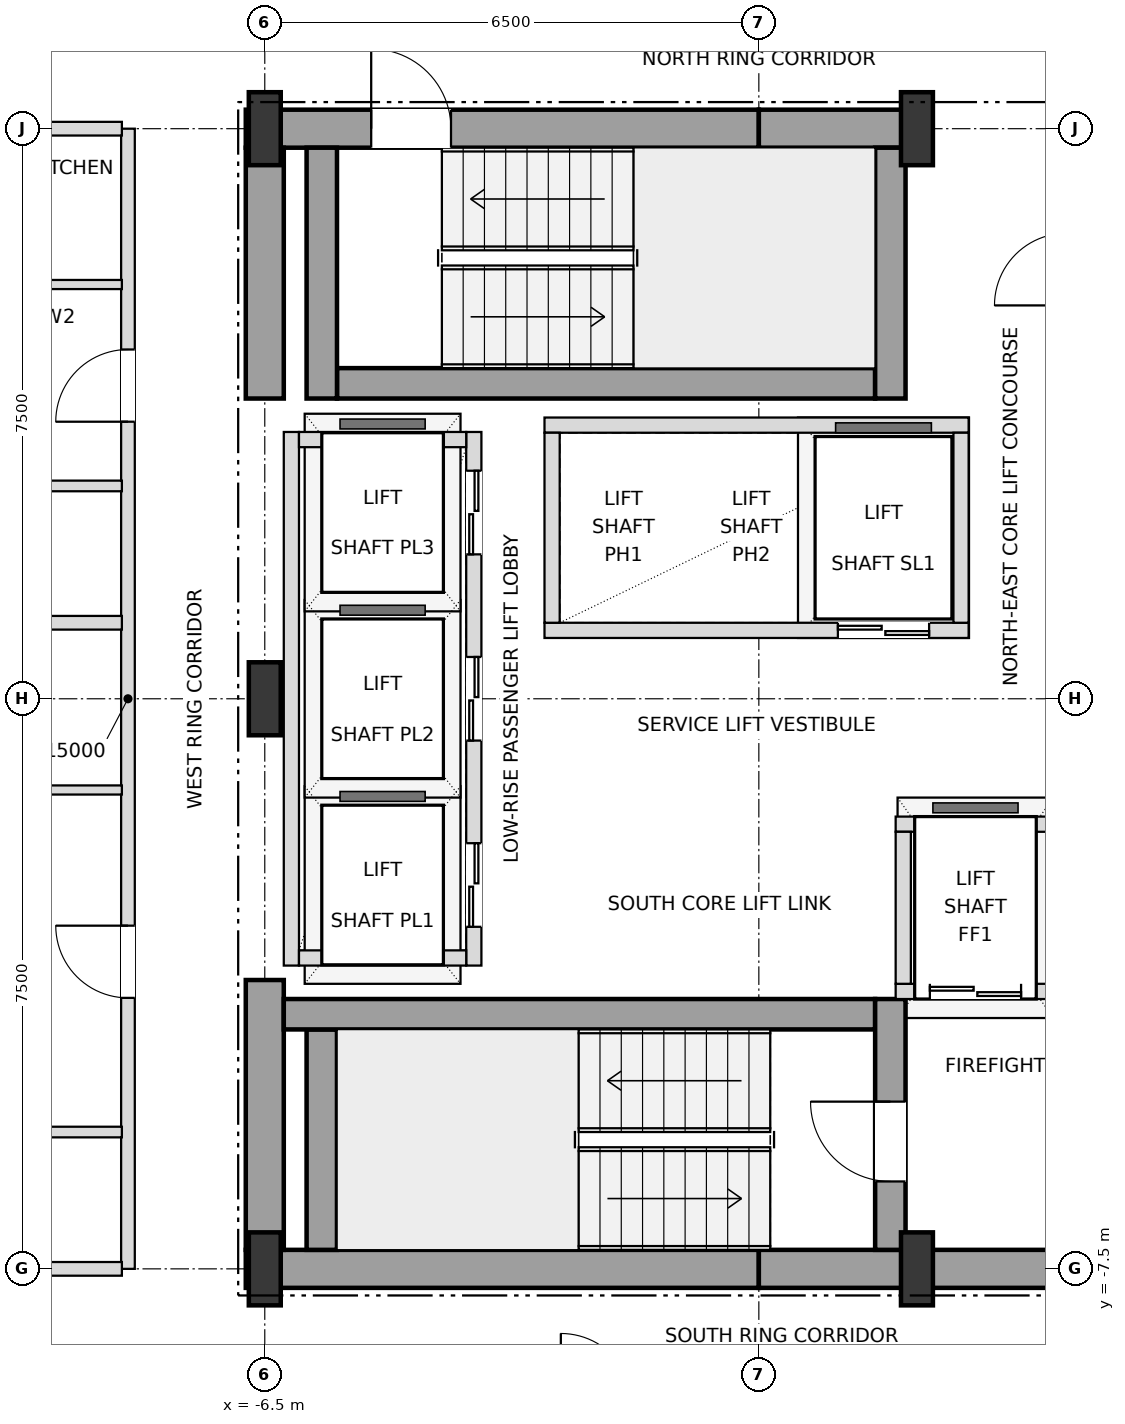
"""IFC4 building model, lengths in metres.
Left out: names, types, materials, properties, quantities, classifications, styles, units other than length and angle.
Written with IfcOpenShell. Run it as: python <this file> out.ifc"""

import sys

from ifc_helpers import new_model, si_unit, direction, frame, frame_2d, origin, origin_2d, place, context, subcontext, project, spatial, rectangle, i_section, extrude, element, fill, save


model = new_model("IFC4")
c1 = context("Model", 3, precision=1e-05, world=origin(), true_north=direction((0.0, 1.0)))
c2 = subcontext(c1, "Body", "Model", "MODEL_VIEW")
j1 = project(units=[si_unit("LENGTHUNIT", "METRE"), si_unit("PLANEANGLEUNIT", "RADIAN")], contexts=[c1])
p1 = place(None, origin())
s1 = spatial("IfcSite", under=j1, at=p1, CompositionType="ELEMENT")
p2 = place(p1, origin())
s2 = spatial("IfcBuilding", under=s1, at=p2, CompositionType="ELEMENT")
p3 = place(p2, frame((0.0, 0.0, 50.4)))
s3 = spatial("IfcBuildingStorey", under=s2, at=p3, CompositionType="ELEMENT", Elevation=50.4)
for number, where, z_axis, x_axis in (
    (1, (-6.5, -7.5, 0.0), (0.0, 0.0, 1.0), (1.0, 0.0, 0.0)),
    (2, (2.08, -7.5, 0.0), (0.0, 0.0, 1.0), (1.0, 0.0, 0.0)),
    (3, (-6.5, 0.0, 0.0), (0.0, 0.0, 1.0), (1.0, 0.0, 0.0)),
    (4, (-6.5, 7.5, 0.0), (0.0, 0.0, 1.0), (1.0, 0.0, 0.0)),
    (5, (2.08, 7.5, 0.0), (0.0, 0.0, 1.0), (1.0, 0.0, 0.0)),
):
    element("IfcColumn", number, at=place(p3, frame(where, z_axis=z_axis, x_axis=x_axis)), inside=s3, PredefinedType="COLUMN", context=c2, shape_type="SweptSolid", body=[
        extrude(i_section(OverallWidth=0.42, OverallDepth=0.96, WebThickness=0.022, FlangeThickness=0.034, at=origin_2d()), origin(), (0.0, 0.0, 1.0), 3.6),
    ])
for number, where, z_axis, x_axis in (
    (6, (-6.75, -7.5, 0.0), (0.0, 0.0, 1.0), (1.0, 0.0, 0.0)),
    (7, (0.0, -7.5, 0.0), (0.0, 0.0, 1.0), (1.0, 0.0, 0.0)),
):
    element("IfcWall", number, at=place(p3, frame(where, z_axis=z_axis, x_axis=x_axis)), inside=s3, PredefinedType="SHEAR", context=c2, shape_type="SweptSolid", body=[
        extrude(rectangle(XDim=6.75, YDim=0.5, at=frame_2d((3.375, 0.0))), origin(), (0.0, 0.0, 1.0), 3.38),
    ])
p4 = place(p3, frame((-6.75, 7.5, 0.0), z_axis=(0.0, 0.0, 1.0), x_axis=(1.0, 0.0, 0.0)))
e8 = element("IfcWall", 8, at=p4, inside=s3, PredefinedType="SHEAR", context=c2, shape_type="SweptSolid", body=[
    extrude(rectangle(XDim=6.75, YDim=0.5, at=frame_2d((3.375, 0.0))), origin(), (0.0, 0.0, 1.0), 3.38),
])
p5 = place(p4, frame((1.65, 0.0, 0.0)))
e9 = element("IfcOpeningElement", 9, at=p5, cuts=e8, PredefinedType="OPENING", context=c2, shape_type="SweptSolid", body=[
    extrude(rectangle(XDim=1.05, YDim=2.15, at=frame_2d((0.525, 1.075))), frame((0.0, 0.26, 0.0), z_axis=(0.0, -1.0, 0.0), x_axis=(1.0, 0.0, 0.0)), (0.0, 0.0, 1.0), 0.52),
])
p6 = place(p3, frame((0.0, 7.5, 0.0), z_axis=(0.0, 0.0, 1.0), x_axis=(1.0, 0.0, 0.0)))
e10 = element("IfcWall", 10, at=p6, inside=s3, PredefinedType="SHEAR", context=c2, shape_type="SweptSolid", body=[
    extrude(rectangle(XDim=2.08, YDim=0.5, at=frame_2d((1.04, 0.0))), origin(), (0.0, 0.0, 1.0), 3.38),
])
p7 = place(p3, frame((-6.5, -7.25, 0.0), z_axis=(0.0, 0.0, 1.0), x_axis=(0.0, 1.0, 0.0)))
e11 = element("IfcWall", 11, at=p7, inside=s3, PredefinedType="SHEAR", context=c2, shape_type="SweptSolid", body=[
    extrude(rectangle(XDim=3.55, YDim=0.5, at=frame_2d((1.775, 0.0))), origin(), (0.0, 0.0, 1.0), 3.38),
])
p8 = place(p3, frame((-6.5, 3.95, 0.0), z_axis=(0.0, 0.0, 1.0), x_axis=(0.0, 1.0, 0.0)))
e12 = element("IfcWall", 12, at=p8, inside=s3, PredefinedType="SHEAR", context=c2, shape_type="SweptSolid", body=[
    extrude(rectangle(XDim=3.3, YDim=0.5, at=frame_2d((1.65, 0.0))), origin(), (0.0, 0.0, 1.0), 3.38),
])
p9 = place(p3, frame((-5.75, -7.25, 0.0), z_axis=(0.0, 0.0, 1.0), x_axis=(0.0, 1.0, 0.0)))
e13 = element("IfcWall", 13, at=p9, inside=s3, PredefinedType="SHEAR", context=c2, shape_type="SweptSolid", body=[
    extrude(rectangle(XDim=2.9, YDim=0.4, at=frame_2d((1.45, 0.0))), origin(), (0.0, 0.0, 1.0), 3.38),
])
p10 = place(p3, frame((-6.25, -4.15, 0.0), z_axis=(0.0, 0.0, 1.0), x_axis=(1.0, 0.0, 0.0)))
e14 = element("IfcWall", 14, at=p10, inside=s3, PredefinedType="SHEAR", context=c2, shape_type="SweptSolid", body=[
    extrude(rectangle(XDim=7.78, YDim=0.4, at=frame_2d((3.89, 0.0))), origin(), (0.0, 0.0, 1.0), 3.38),
])
p11 = place(p3, frame((1.73, -7.25, 0.0), z_axis=(0.0, 0.0, 1.0), x_axis=(0.0, 1.0, 0.0)))
e15 = element("IfcWall", 15, at=p11, inside=s3, PredefinedType="SHEAR", context=c2, shape_type="SweptSolid", body=[
    extrude(rectangle(XDim=3.3, YDim=0.4, at=frame_2d((1.65, 0.0))), origin(), (0.0, 0.0, 1.0), 3.38),
])
p12 = place(p11, frame((0.9, 0.0, 0.0)))
e16 = element("IfcOpeningElement", 16, at=p12, cuts=e15, PredefinedType="OPENING", context=c2, shape_type="SweptSolid", body=[
    extrude(rectangle(XDim=1.05, YDim=2.15, at=frame_2d((0.525, 1.075))), frame((0.0, 0.21, 0.0), z_axis=(0.0, -1.0, 0.0), x_axis=(1.0, 0.0, 0.0)), (0.0, 0.0, 1.0), 0.42),
])
p13 = place(p3, frame((-5.55, 4.15, 0.0), z_axis=(0.0, 0.0, 1.0), x_axis=(1.0, 0.0, 0.0)))
e17 = element("IfcWall", 17, at=p13, inside=s3, PredefinedType="SHEAR", context=c2, shape_type="SweptSolid", body=[
    extrude(rectangle(XDim=7.08, YDim=0.4, at=frame_2d((3.54, 0.0))), origin(), (0.0, 0.0, 1.0), 3.38),
])
for number, where, z_axis, x_axis in (
    (18, (1.73, 3.95, 0.0), (0.0, 0.0, 1.0), (0.0, 1.0, 0.0)),
    (19, (-5.75, 3.95, 0.0), (0.0, 0.0, 1.0), (0.0, 1.0, 0.0)),
):
    element("IfcWall", number, at=place(p3, frame(where, z_axis=z_axis, x_axis=x_axis)), inside=s3, PredefinedType="SHEAR", context=c2, shape_type="SweptSolid", body=[
        extrude(rectangle(XDim=3.3, YDim=0.4, at=frame_2d((1.65, 0.0))), origin(), (0.0, 0.0, 1.0), 3.38),
    ])
p14 = place(p3, frame((-3.75, -3.51, 0.0), z_axis=(0.0, 0.0, 1.0), x_axis=(0.0, 1.0, 0.0)))
e20 = element("IfcWall", 20, at=p14, inside=s3, PredefinedType="SOLIDWALL", context=c2, shape_type="SweptSolid", body=[
    extrude(rectangle(XDim=7.02, YDim=0.2, at=frame_2d((3.51, 0.0))), origin(), (0.0, 0.0, 1.0), 3.38),
])
p15 = place(p14, frame((0.51, 0.0, 0.0)))
e21 = element("IfcOpeningElement", 21, at=p15, cuts=e20, PredefinedType="OPENING", context=c2, shape_type="SweptSolid", body=[
    extrude(rectangle(XDim=1.1, YDim=2.15, at=frame_2d((0.55, 1.075))), frame((0.0, 0.11, 0.0), z_axis=(0.0, -1.0, 0.0), x_axis=(1.0, 0.0, 0.0)), (0.0, 0.0, 1.0), 0.22),
])
p16 = place(p14, frame((2.96, 0.0, 0.0)))
e22 = element("IfcOpeningElement", 22, at=p16, cuts=e20, PredefinedType="OPENING", context=c2, shape_type="SweptSolid", body=[
    extrude(rectangle(XDim=1.1, YDim=2.15, at=frame_2d((0.55, 1.075))), frame((0.0, 0.11, 0.0), z_axis=(0.0, -1.0, 0.0), x_axis=(1.0, 0.0, 0.0)), (0.0, 0.0, 1.0), 0.22),
])
p17 = place(p14, frame((5.41, 0.0, 0.0)))
e23 = element("IfcOpeningElement", 23, at=p17, cuts=e20, PredefinedType="OPENING", context=c2, shape_type="SweptSolid", body=[
    extrude(rectangle(XDim=1.1, YDim=2.15, at=frame_2d((0.55, 1.075))), frame((0.0, 0.11, 0.0), z_axis=(0.0, -1.0, 0.0), x_axis=(1.0, 0.0, 0.0)), (0.0, 0.0, 1.0), 0.22),
])
p18 = place(p3, frame((-6.15, -3.51, 0.0), z_axis=(0.0, 0.0, 1.0), x_axis=(0.0, 1.0, 0.0)))
e24 = element("IfcWall", 24, at=p18, inside=s3, PredefinedType="SOLIDWALL", context=c2, shape_type="SweptSolid", body=[
    extrude(rectangle(XDim=7.02, YDim=0.2, at=frame_2d((3.51, 0.0))), origin(), (0.0, 0.0, 1.0), 3.38),
])
for number, where, z_axis, x_axis in (
    (25, (-6.05, -3.41, 0.0), (0.0, 0.0, 1.0), (1.0, 0.0, 0.0)),
    (26, (-6.05, 3.41, 0.0), (0.0, 0.0, 1.0), (1.0, 0.0, 0.0)),
):
    element("IfcWall", number, at=place(p3, frame(where, z_axis=z_axis, x_axis=x_axis)), inside=s3, PredefinedType="SOLIDWALL", context=c2, shape_type="SweptSolid", body=[
        extrude(rectangle(XDim=2.2, YDim=0.2, at=frame_2d((1.1, 0.0))), origin(), (0.0, 0.0, 1.0), 3.38),
    ])
p19 = place(p3, frame((-2.82, 0.9, 0.0), z_axis=(0.0, 0.0, 1.0), x_axis=(1.0, 0.0, 0.0)))
e27 = element("IfcWall", 27, at=p19, inside=s3, PredefinedType="SOLIDWALL", context=c2, shape_type="SweptSolid", body=[
    extrude(rectangle(XDim=5.58, YDim=0.2, at=frame_2d((2.79, 0.0))), origin(), (0.0, 0.0, 1.0), 3.38),
])
p20 = place(p19, frame((3.86, 0.0, 0.0)))
e28 = element("IfcOpeningElement", 28, at=p20, cuts=e27, PredefinedType="OPENING", context=c2, shape_type="SweptSolid", body=[
    extrude(rectangle(XDim=1.2, YDim=2.2, at=frame_2d((0.6, 1.1))), frame((0.0, 0.11, 0.0), z_axis=(0.0, -1.0, 0.0), x_axis=(1.0, 0.0, 0.0)), (0.0, 0.0, 1.0), 0.22),
])
p21 = place(p3, frame((-2.82, 3.6, 0.0), z_axis=(0.0, 0.0, 1.0), x_axis=(1.0, 0.0, 0.0)))
e29 = element("IfcWall", 29, at=p21, inside=s3, PredefinedType="SOLIDWALL", context=c2, shape_type="SweptSolid", body=[
    extrude(rectangle(XDim=5.58, YDim=0.2, at=frame_2d((2.79, 0.0))), origin(), (0.0, 0.0, 1.0), 3.38),
])
for number, where, z_axis, x_axis in (
    (30, (-2.72, 1.0, 0.0), (0.0, 0.0, 1.0), (0.0, 1.0, 0.0)),
    (31, (2.66, 1.0, 0.0), (0.0, 0.0, 1.0), (0.0, 1.0, 0.0)),
):
    element("IfcWall", number, at=place(p3, frame(where, z_axis=z_axis, x_axis=x_axis)), inside=s3, PredefinedType="SOLIDWALL", context=c2, shape_type="SweptSolid", body=[
        extrude(rectangle(XDim=2.5, YDim=0.2, at=frame_2d((1.25, 0.0))), origin(), (0.0, 0.0, 1.0), 3.38),
    ])
p22 = place(p3, frame((1.8, -3.85, 0.0), z_axis=(0.0, 0.0, 1.0), x_axis=(1.0, 0.0, 0.0)))
e32 = element("IfcWall", 32, at=p22, inside=s3, PredefinedType="SOLIDWALL", context=c2, shape_type="SweptSolid", body=[
    extrude(rectangle(XDim=4.1, YDim=0.2, at=frame_2d((2.05, 0.0))), origin(), (0.0, 0.0, 1.0), 3.38),
])
p23 = place(p22, frame((0.45, 0.0, 0.0)))
e33 = element("IfcOpeningElement", 33, at=p23, cuts=e32, PredefinedType="OPENING", context=c2, shape_type="SweptSolid", body=[
    extrude(rectangle(XDim=1.2, YDim=2.2, at=frame_2d((0.6, 1.1))), frame((0.0, 0.11, 0.0), z_axis=(0.0, -1.0, 0.0), x_axis=(1.0, 0.0, 0.0)), (0.0, 0.0, 1.0), 0.22),
])
p24 = place(p22, frame((2.45, 0.0, 0.0)))
e34 = element("IfcOpeningElement", 34, at=p24, cuts=e32, PredefinedType="OPENING", context=c2, shape_type="SweptSolid", body=[
    extrude(rectangle(XDim=1.2, YDim=2.2, at=frame_2d((0.6, 1.1))), frame((0.0, 0.11, 0.0), z_axis=(0.0, -1.0, 0.0), x_axis=(1.0, 0.0, 0.0)), (0.0, 0.0, 1.0), 0.22),
])
p25 = place(p3, frame((1.8, -1.65, 0.0), z_axis=(0.0, 0.0, 1.0), x_axis=(1.0, 0.0, 0.0)))
e35 = element("IfcWall", 35, at=p25, inside=s3, PredefinedType="SOLIDWALL", context=c2, shape_type="SweptSolid", body=[
    extrude(rectangle(XDim=4.1, YDim=0.2, at=frame_2d((2.05, 0.0))), origin(), (0.0, 0.0, 1.0), 3.38),
])
p26 = place(p3, frame((1.9, -3.75, 0.0), z_axis=(0.0, 0.0, 1.0), x_axis=(0.0, 1.0, 0.0)))
e36 = element("IfcWall", 36, at=p26, inside=s3, PredefinedType="SOLIDWALL", context=c2, shape_type="SweptSolid", body=[
    extrude(rectangle(XDim=2.0, YDim=0.2, at=frame_2d((1.0, 0.0))), origin(), (0.0, 0.0, 1.0), 3.38),
])
p27 = place(p3, frame((-8.3, -7.5, 0.0), z_axis=(0.0, 0.0, 1.0), x_axis=(0.0, 1.0, 0.0)))
e37 = element("IfcWall", 37, at=p27, inside=s3, PredefinedType="PARTITIONING", context=c2, shape_type="SweptSolid", body=[
    extrude(rectangle(XDim=15.0, YDim=0.18, at=frame_2d((7.5, 0.0))), origin(), (0.0, 0.0, 1.0), 3.38),
])
p28 = place(p27, frame((3.565, 0.0, 0.0)))
e38 = element("IfcOpeningElement", 38, at=p28, cuts=e37, PredefinedType="OPENING", context=c2, shape_type="SweptSolid", body=[
    extrude(rectangle(XDim=0.95, YDim=2.15, at=frame_2d((0.475, 1.075))), frame((0.0, 0.1, 0.0), z_axis=(0.0, -1.0, 0.0), x_axis=(1.0, 0.0, 0.0)), (0.0, 0.0, 1.0), 0.2),
])
p29 = place(p27, frame((11.145, 0.0, 0.0)))
e39 = element("IfcOpeningElement", 39, at=p29, cuts=e37, PredefinedType="OPENING", context=c2, shape_type="SweptSolid", body=[
    extrude(rectangle(XDim=0.95, YDim=2.15, at=frame_2d((0.475, 1.075))), frame((0.0, 0.1, 0.0), z_axis=(0.0, -1.0, 0.0), x_axis=(1.0, 0.0, 0.0)), (0.0, 0.0, 1.0), 0.2),
])
p30 = place(p3, frame((-16.02, -7.5, 0.0), z_axis=(0.0, 0.0, 1.0), x_axis=(1.0, 0.0, 0.0)))
e40 = element("IfcWall", 40, at=p30, inside=s3, PredefinedType="PARTITIONING", context=c2, shape_type="SweptSolid", body=[
    extrude(rectangle(XDim=7.64, YDim=0.18, at=frame_2d((3.82, 0.0))), origin(), (0.0, 0.0, 1.0), 2.816),
])
p31 = place(p3, frame((-16.02, -5.7, 0.0), z_axis=(0.0, 0.0, 1.0), x_axis=(1.0, 0.0, 0.0)))
e41 = element("IfcWall", 41, at=p31, inside=s3, PredefinedType="PARTITIONING", context=c2, shape_type="SweptSolid", body=[
    extrude(rectangle(XDim=7.64, YDim=0.14, at=frame_2d((3.82, 0.0))), origin(), (0.0, 0.0, 1.0), 2.948),
])
p32 = place(p31, frame((3.37, 0.0, 0.0)))
e42 = element("IfcOpeningElement", 42, at=p32, cuts=e41, PredefinedType="OPENING", context=c2, shape_type="SweptSolid", body=[
    extrude(rectangle(XDim=0.9, YDim=2.1, at=frame_2d((0.45, 1.05))), frame((0.0, 0.08, 0.0), z_axis=(0.0, -1.0, 0.0), x_axis=(1.0, 0.0, 0.0)), (0.0, 0.0, 1.0), 0.16),
])
p33 = place(p3, frame((-16.02, -1.2, 0.0), z_axis=(0.0, 0.0, 1.0), x_axis=(1.0, 0.0, 0.0)))
e43 = element("IfcWall", 43, at=p33, inside=s3, PredefinedType="PARTITIONING", context=c2, shape_type="SweptSolid", body=[
    extrude(rectangle(XDim=7.64, YDim=0.12, at=frame_2d((3.82, 0.0))), origin(), (0.0, 0.0, 1.0), 2.948),
])
p34 = place(p33, frame((3.345, 0.0, 0.0)))
e44 = element("IfcOpeningElement", 44, at=p34, cuts=e43, PredefinedType="OPENING", context=c2, shape_type="SweptSolid", body=[
    extrude(rectangle(XDim=0.95, YDim=2.1, at=frame_2d((0.475, 1.05))), frame((0.0, 0.07, 0.0), z_axis=(0.0, -1.0, 0.0), x_axis=(1.0, 0.0, 0.0)), (0.0, 0.0, 1.0), 0.14),
])
p35 = place(p3, frame((-16.02, 1.0, 0.0), z_axis=(0.0, 0.0, 1.0), x_axis=(1.0, 0.0, 0.0)))
e45 = element("IfcWall", 45, at=p35, inside=s3, PredefinedType="PARTITIONING", context=c2, shape_type="SweptSolid", body=[
    extrude(rectangle(XDim=7.64, YDim=0.18, at=frame_2d((3.82, 0.0))), origin(), (0.0, 0.0, 1.0), 2.948),
])
p36 = place(p3, frame((-16.02, 2.8, 0.0), z_axis=(0.0, 0.0, 1.0), x_axis=(1.0, 0.0, 0.0)))
e46 = element("IfcWall", 46, at=p36, inside=s3, PredefinedType="PARTITIONING", context=c2, shape_type="SweptSolid", body=[
    extrude(rectangle(XDim=7.64, YDim=0.14, at=frame_2d((3.82, 0.0))), origin(), (0.0, 0.0, 1.0), 2.948),
])
p37 = place(p36, frame((3.37, 0.0, 0.0)))
e47 = element("IfcOpeningElement", 47, at=p37, cuts=e46, PredefinedType="OPENING", context=c2, shape_type="SweptSolid", body=[
    extrude(rectangle(XDim=0.9, YDim=2.1, at=frame_2d((0.45, 1.05))), frame((0.0, 0.08, 0.0), z_axis=(0.0, -1.0, 0.0), x_axis=(1.0, 0.0, 0.0)), (0.0, 0.0, 1.0), 0.16),
])
p38 = place(p3, frame((-16.02, 5.45, 0.0), z_axis=(0.0, 0.0, 1.0), x_axis=(1.0, 0.0, 0.0)))
e48 = element("IfcWall", 48, at=p38, inside=s3, PredefinedType="PARTITIONING", context=c2, shape_type="SweptSolid", body=[
    extrude(rectangle(XDim=7.64, YDim=0.12, at=frame_2d((3.82, 0.0))), origin(), (0.0, 0.0, 1.0), 2.948),
])
p39 = place(p38, frame((3.345, 0.0, 0.0)))
e49 = element("IfcOpeningElement", 49, at=p39, cuts=e48, PredefinedType="OPENING", context=c2, shape_type="SweptSolid", body=[
    extrude(rectangle(XDim=0.95, YDim=2.1, at=frame_2d((0.475, 1.05))), frame((0.0, 0.07, 0.0), z_axis=(0.0, -1.0, 0.0), x_axis=(1.0, 0.0, 0.0)), (0.0, 0.0, 1.0), 0.14),
])
p40 = place(p3, frame((-16.02, 7.5, 0.0), z_axis=(0.0, 0.0, 1.0), x_axis=(1.0, 0.0, 0.0)))
e50 = element("IfcWall", 50, at=p40, inside=s3, PredefinedType="PARTITIONING", context=c2, shape_type="SweptSolid", body=[
    extrude(rectangle(XDim=7.64, YDim=0.18, at=frame_2d((3.82, 0.0))), origin(), (0.0, 0.0, 1.0), 2.816),
])
p41 = place(p12, origin())
e51 = element("IfcDoor", 51, at=p41, inside=s3, OperationType="SINGLE_SWING_RIGHT", PredefinedType="DOOR", context=c2, shape_type="SweptSolid", body=[
    extrude(rectangle(XDim=1.05, YDim=2.15, at=frame_2d((0.525, 1.075))), frame((0.0, 0.025, 0.0), z_axis=(0.0, -1.0, 0.0), x_axis=(1.0, 0.0, 0.0)), (0.0, 0.0, 1.0), 0.05),
])
fill(e16, e51)
p42 = place(p5, origin())
e52 = element("IfcDoor", 52, at=p42, inside=s3, OperationType="SINGLE_SWING_LEFT", PredefinedType="DOOR", context=c2, shape_type="SweptSolid", body=[
    extrude(rectangle(XDim=1.05, YDim=2.15, at=frame_2d((0.525, 1.075))), frame((0.0, 0.025, 0.0), z_axis=(0.0, -1.0, 0.0), x_axis=(1.0, 0.0, 0.0)), (0.0, 0.0, 1.0), 0.05),
])
fill(e9, e52)
p43 = place(p15, origin())
e53 = element("IfcDoor", 53, at=p43, inside=s3, OperationType="DOUBLE_DOOR_SLIDING", PredefinedType="DOOR", context=c2, shape_type="SweptSolid", body=[
    extrude(rectangle(XDim=1.1, YDim=2.15, at=frame_2d((0.55, 1.075))), frame((0.0, 0.025, 0.0), z_axis=(0.0, -1.0, 0.0), x_axis=(1.0, 0.0, 0.0)), (0.0, 0.0, 1.0), 0.05),
])
fill(e21, e53)
p44 = place(p16, origin())
e54 = element("IfcDoor", 54, at=p44, inside=s3, OperationType="DOUBLE_DOOR_SLIDING", PredefinedType="DOOR", context=c2, shape_type="SweptSolid", body=[
    extrude(rectangle(XDim=1.1, YDim=2.15, at=frame_2d((0.55, 1.075))), frame((0.0, 0.025, 0.0), z_axis=(0.0, -1.0, 0.0), x_axis=(1.0, 0.0, 0.0)), (0.0, 0.0, 1.0), 0.05),
])
fill(e22, e54)
p45 = place(p17, origin())
e55 = element("IfcDoor", 55, at=p45, inside=s3, OperationType="DOUBLE_DOOR_SLIDING", PredefinedType="DOOR", context=c2, shape_type="SweptSolid", body=[
    extrude(rectangle(XDim=1.1, YDim=2.15, at=frame_2d((0.55, 1.075))), frame((0.0, 0.025, 0.0), z_axis=(0.0, -1.0, 0.0), x_axis=(1.0, 0.0, 0.0)), (0.0, 0.0, 1.0), 0.05),
])
fill(e23, e55)
p46 = place(p20, origin())
e56 = element("IfcDoor", 56, at=p46, inside=s3, OperationType="DOUBLE_DOOR_SLIDING", PredefinedType="DOOR", context=c2, shape_type="SweptSolid", body=[
    extrude(rectangle(XDim=1.2, YDim=2.2, at=frame_2d((0.6, 1.1))), frame((0.0, 0.025, 0.0), z_axis=(0.0, -1.0, 0.0), x_axis=(1.0, 0.0, 0.0)), (0.0, 0.0, 1.0), 0.05),
])
fill(e28, e56)
p47 = place(p23, origin())
e57 = element("IfcDoor", 57, at=p47, inside=s3, OperationType="DOUBLE_DOOR_SLIDING", PredefinedType="DOOR", context=c2, shape_type="SweptSolid", body=[
    extrude(rectangle(XDim=1.2, YDim=2.2, at=frame_2d((0.6, 1.1))), frame((0.0, 0.025, 0.0), z_axis=(0.0, -1.0, 0.0), x_axis=(1.0, 0.0, 0.0)), (0.0, 0.0, 1.0), 0.05),
])
fill(e33, e57)
p48 = place(p28, origin())
e58 = element("IfcDoor", 58, at=p48, inside=s3, OperationType="SINGLE_SWING_RIGHT", PredefinedType="DOOR", context=c2, shape_type="SweptSolid", body=[
    extrude(rectangle(XDim=0.95, YDim=2.15, at=frame_2d((0.475, 1.075))), frame((0.0, 0.025, 0.0), z_axis=(0.0, -1.0, 0.0), x_axis=(1.0, 0.0, 0.0)), (0.0, 0.0, 1.0), 0.05),
])
fill(e38, e58)
p49 = place(p29, origin())
e59 = element("IfcDoor", 59, at=p49, inside=s3, OperationType="SINGLE_SWING_LEFT", PredefinedType="DOOR", context=c2, shape_type="SweptSolid", body=[
    extrude(rectangle(XDim=0.95, YDim=2.15, at=frame_2d((0.475, 1.075))), frame((0.0, 0.025, 0.0), z_axis=(0.0, -1.0, 0.0), x_axis=(1.0, 0.0, 0.0)), (0.0, 0.0, 1.0), 0.05),
])
fill(e39, e59)
save(model, sys.argv[1])
